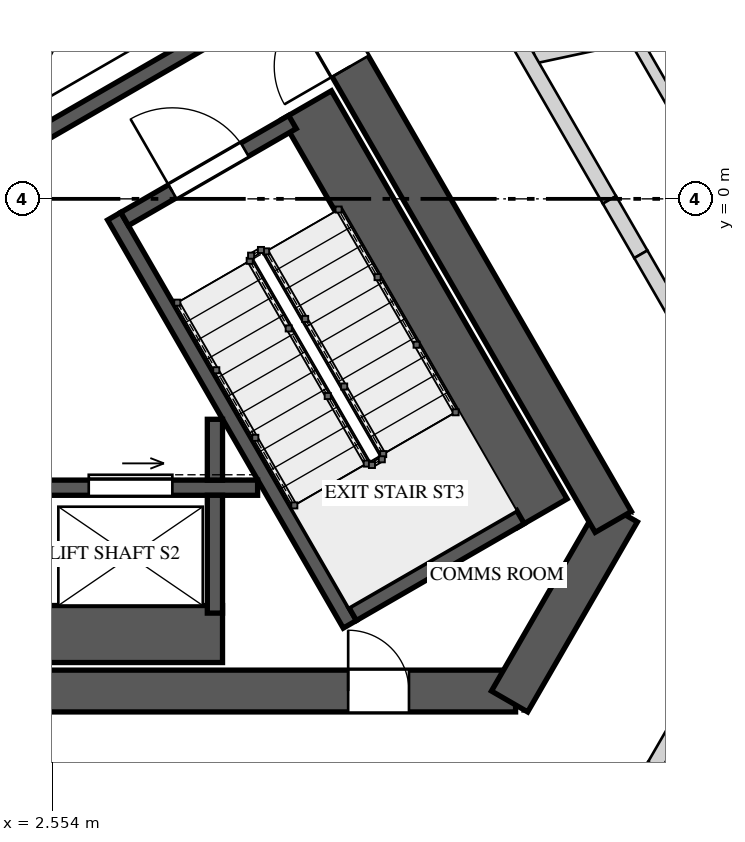
"""IFC4 building model, lengths in metres.
Left out: names, types, materials, properties, quantities, classifications, styles, units other than length and angle.
Written with IfcOpenShell. Run it as: python <this file> out.ifc"""

import sys

from ifc_helpers import new_model, si_unit, direction, frame, frame_2d, origin, place, context, subcontext, project, spatial, rectangle, extrude, element, fill, save


model = new_model("IFC4")
c1 = context("Model", 3, precision=1e-05, world=origin(), true_north=direction((0.0, 1.0)))
c2 = subcontext(c1, "Body", "Model", "MODEL_VIEW")
j1 = project(units=[si_unit("LENGTHUNIT", "METRE"), si_unit("PLANEANGLEUNIT", "RADIAN")], contexts=[c1])
p1 = place(None, origin())
s1 = spatial("IfcSite", under=j1, at=p1, CompositionType="ELEMENT")
p2 = place(p1, origin())
s2 = spatial("IfcBuilding", under=s1, at=p2, CompositionType="ELEMENT")
p3 = place(p2, frame((0.0, 0.0, 348.4)))
s3 = spatial("IfcBuildingStorey", under=s2, at=p3, CompositionType="ELEMENT", Elevation=348.4)
p4 = place(p3, frame((-8.646, -6.475, 0.0), z_axis=(0.0, 0.0, 1.0), x_axis=(1.0, 0.0, 0.0)))
e1 = element("IfcWall", 1, at=p4, inside=s3, PredefinedType="SHEAR", context=c2, shape_type="SweptSolid", body=[
    extrude(rectangle(XDim=17.292, YDim=0.55, at=frame_2d((8.646, 0.0))), origin(), (0.0, 0.0, 1.0), 4.0),
])
p5 = place(p4, frame((6.851, 0.0, 0.0)))
e2 = element("IfcOpeningElement", 2, at=p5, cuts=e1, PredefinedType="OPENING", context=c2, shape_type="SweptSolid", body=[
    extrude(rectangle(XDim=1.0, YDim=2.4, at=frame_2d((0.5, 1.2))), frame((0.0, 0.285, 0.0), z_axis=(0.0, -1.0, 0.0), x_axis=(1.0, 0.0, 0.0)), (0.0, 0.0, 1.0), 0.57),
])
p6 = place(p4, frame((15.089, 0.0, 0.0)))
e3 = element("IfcOpeningElement", 3, at=p6, cuts=e1, PredefinedType="OPENING", context=c2, shape_type="SweptSolid", body=[
    extrude(rectangle(XDim=0.8, YDim=2.1, at=frame_2d((0.4, 1.05))), frame((0.0, 0.285, 0.0), z_axis=(0.0, -1.0, 0.0), x_axis=(1.0, 0.0, 0.0)), (0.0, 0.0, 1.0), 0.57),
])
p7 = place(p3, frame((8.566, -6.613, 0.0), z_axis=(0.0, 0.0, 1.0), x_axis=(0.499995765644, 0.866027848477, 0.0)))
e4 = element("IfcWall", 4, at=p7, inside=s3, PredefinedType="SHEAR", context=c2, shape_type="SweptSolid", body=[
    extrude(rectangle(XDim=2.887, YDim=0.55, at=frame_2d((1.443, 0.0))), origin(), (0.0, 0.0, 1.0), 4.0),
])
p8 = place(p3, frame((9.93, -4.25, 0.0), z_axis=(0.0, 0.0, 1.0), x_axis=(-0.499994590896, 0.86602852671, 0.0)))
e5 = element("IfcWall", 5, at=p8, inside=s3, PredefinedType="SHEAR", context=c2, shape_type="SweptSolid", body=[
    extrude(rectangle(XDim=17.292, YDim=0.55, at=frame_2d((8.646, 0.0))), origin(), (0.0, 0.0, 1.0), 4.0),
])
p9 = place(p8, frame((6.921, 0.0, 0.0)))
e6 = element("IfcOpeningElement", 6, at=p9, cuts=e5, PredefinedType="OPENING", context=c2, shape_type="SweptSolid", body=[
    extrude(rectangle(XDim=1.0, YDim=2.4, at=frame_2d((0.5, 1.2))), frame((0.0, 0.285, 0.0), z_axis=(0.0, -1.0, 0.0), x_axis=(1.0, 0.0, 0.0)), (0.0, 0.0, 1.0), 0.57),
])
p10 = place(p3, frame((8.998, -4.135, 0.0), z_axis=(0.0, 0.0, 1.0), x_axis=(-0.500009909098, 0.866019682689, 0.0)))
e7 = element("IfcWall", 7, at=p10, inside=s3, PredefinedType="SOLIDWALL", context=c2, shape_type="SweptSolid", body=[
    extrude(rectangle(XDim=6.2, YDim=0.75, at=frame_2d((3.1, 0.0))), origin(), (0.0, 0.0, 1.0), 3.65),
])
p11 = place(p3, frame((6.465, -5.597, 0.0), z_axis=(0.0, 0.0, 1.0), x_axis=(-0.49998037582, 0.866036733513, 0.0)))
e8 = element("IfcWall", 8, at=p11, inside=s3, PredefinedType="SOLIDWALL", context=c2, shape_type="SweptSolid", body=[
    extrude(rectangle(XDim=6.2, YDim=0.2, at=frame_2d((3.1, 0.0))), origin(), (0.0, 0.0, 1.0), 3.65),
])
p12 = place(p3, frame((6.501, -5.461, 0.0), z_axis=(0.0, 0.0, 1.0), x_axis=(0.865989465428, 0.500062241894, 0.0)))
e9 = element("IfcWall", 9, at=p12, inside=s3, PredefinedType="SOLIDWALL", context=c2, shape_type="SweptSolid", body=[
    extrude(rectangle(XDim=2.55, YDim=0.2, at=frame_2d((1.275, 0.0))), origin(), (0.0, 0.0, 1.0), 3.65),
])
p13 = place(p3, frame((3.501, -0.265, 0.0), z_axis=(0.0, 0.0, 1.0), x_axis=(0.866030925526, 0.499990435942, 0.0)))
e10 = element("IfcWall", 10, at=p13, inside=s3, PredefinedType="SOLIDWALL", context=c2, shape_type="SweptSolid", body=[
    extrude(rectangle(XDim=2.55, YDim=0.2, at=frame_2d((1.275, 0.0))), origin(), (0.0, 0.0, 1.0), 3.65),
])
p14 = place(p13, frame((0.725, 0.0, 0.0)))
e11 = element("IfcOpeningElement", 11, at=p14, cuts=e10, PredefinedType="OPENING", context=c2, shape_type="SweptSolid", body=[
    extrude(rectangle(XDim=1.1, YDim=2.4, at=frame_2d((0.55, 1.2))), frame((0.0, 0.11, 0.0), z_axis=(0.0, -1.0, 0.0), x_axis=(1.0, 0.0, 0.0)), (0.0, 0.0, 1.0), 0.22),
])
p15 = place(p3, frame((-0.71, -3.8, 0.0), z_axis=(0.0, 0.0, 1.0), x_axis=(1.0, 0.0, 0.0)))
e12 = element("IfcWall", 12, at=p15, inside=s3, PredefinedType="SOLIDWALL", context=c2, shape_type="SweptSolid", body=[
    extrude(rectangle(XDim=5.961, YDim=0.2, at=frame_2d((2.981, 0.0))), origin(), (0.0, 0.0, 1.0), 3.65),
])
p16 = place(p15, frame((1.09, 0.0, 0.0)))
e13 = element("IfcOpeningElement", 13, at=p16, cuts=e12, PredefinedType="OPENING", context=c2, shape_type="SweptSolid", body=[
    extrude(rectangle(XDim=1.1, YDim=2.1, at=frame_2d((0.55, 1.05))), frame((0.0, 0.11, 0.0), z_axis=(0.0, -1.0, 0.0), x_axis=(1.0, 0.0, 0.0)), (0.0, 0.0, 1.0), 0.22),
])
p17 = place(p15, frame((3.74, 0.0, 0.0)))
e14 = element("IfcOpeningElement", 14, at=p17, cuts=e12, PredefinedType="OPENING", context=c2, shape_type="SweptSolid", body=[
    extrude(rectangle(XDim=1.1, YDim=2.1, at=frame_2d((0.55, 1.05))), frame((0.0, 0.11, 0.0), z_axis=(0.0, -1.0, 0.0), x_axis=(1.0, 0.0, 0.0)), (0.0, 0.0, 1.0), 0.22),
])
p18 = place(p3, frame((-0.71, -5.725, 0.0), z_axis=(0.0, 0.0, 1.0), x_axis=(1.0, 0.0, 0.0)))
e15 = element("IfcWall", 15, at=p18, inside=s3, PredefinedType="SOLIDWALL", context=c2, shape_type="SweptSolid", body=[
    extrude(rectangle(XDim=5.5, YDim=0.75, at=frame_2d((2.75, 0.0))), origin(), (0.0, 0.0, 1.0), 3.65),
])
p19 = place(p3, frame((4.69, -3.9, 0.0), z_axis=(0.0, 0.0, 1.0), x_axis=(0.0, -1.0, 0.0)))
e16 = element("IfcWall", 16, at=p19, inside=s3, PredefinedType="SOLIDWALL", context=c2, shape_type="SweptSolid", body=[
    extrude(rectangle(XDim=1.55, YDim=0.2, at=frame_2d((0.775, 0.0))), origin(), (0.0, 0.0, 1.0), 3.65),
])
p20 = place(p3, frame((4.69, -2.9, 0.0), z_axis=(0.0, 0.0, 1.0), x_axis=(0.0, -1.0, 0.0)))
e17 = element("IfcWall", 17, at=p20, inside=s3, PredefinedType="SOLIDWALL", context=c2, shape_type="SweptSolid", body=[
    extrude(rectangle(XDim=0.8, YDim=0.2, at=frame_2d((0.4, 0.0))), origin(), (0.0, 0.0, 1.0), 3.65),
])
p21 = place(p3, frame((2.227, 0.743, 0.0), z_axis=(0.0, 0.0, 1.0), x_axis=(0.866035871367, 0.499981869177, 0.0)))
e18 = element("IfcWall", 18, at=p21, inside=s3, PredefinedType="SOLIDWALL", context=c2, shape_type="SweptSolid", body=[
    extrude(rectangle(XDim=3.15, YDim=0.2, at=frame_2d((1.575, 0.0))), origin(), (0.0, 0.0, 1.0), 3.65),
])
p22 = place(p3, frame((9.42, 3.483, 0.0), z_axis=(0.0, 0.0, 1.0), x_axis=(0.50002680699, -0.866009926209, 0.0)))
e19 = element("IfcWall", 19, at=p22, inside=s3, PredefinedType="PARTITIONING", context=c2, shape_type="SweptSolid", body=[
    extrude(rectangle(XDim=4.12, YDim=0.15, at=frame_2d((2.06, 0.0))), origin(), (0.0, 0.0, 1.0), 3.65),
])
p23 = place(p22, frame((0.207, 0.0, 0.0)))
e20 = element("IfcOpeningElement", 20, at=p23, cuts=e19, PredefinedType="OPENING", context=c2, shape_type="SweptSolid", body=[
    extrude(rectangle(XDim=0.95, YDim=2.4, at=frame_2d((0.475, 1.2))), frame((0.0, 0.085, 0.0), z_axis=(0.0, -1.0, 0.0), x_axis=(1.0, 0.0, 0.0)), (0.0, 0.0, 1.0), 0.17),
])
p24 = place(p3, frame((8.888, 1.906, 0.0), z_axis=(0.0, 0.0, 1.0), x_axis=(0.977766421374, 0.209696984321, 0.0)))
e21 = element("IfcWall", 21, at=p24, inside=s3, PredefinedType="SOLIDWALL", context=c2, shape_type="SweptSolid", body=[
    extrude(rectangle(XDim=5.064, YDim=0.25, at=frame_2d((2.532, 0.0))), origin(), (0.0, 0.0, 1.0), 3.65),
])
p25 = place(p3, frame((10.825, -6.851, 0.0), z_axis=(0.0, 0.0, 1.0), x_axis=(-0.500144223137, -0.865942120504, 0.0)))
e22 = element("IfcWall", 22, at=p25, inside=s3, PredefinedType="SOLIDWALL", context=c2, shape_type="SweptSolid", body=[
    extrude(rectangle(XDim=0.701, YDim=0.2, at=frame_2d((0.351, 0.0))), origin(), (0.0, 0.0, 1.0), 2.95),
])
p26 = place(p3, frame((10.474, -7.458, 0.0), z_axis=(0.0, 0.0, 1.0), x_axis=(-0.499929168788, -0.866066294342, 0.0)))
e23 = element("IfcWall", 23, at=p26, inside=s3, PredefinedType="SOLIDWALL", context=c2, shape_type="SweptSolid", body=[
    extrude(rectangle(XDim=1.261, YDim=0.2, at=frame_2d((0.63, 0.0))), origin(), (0.0, 0.0, 1.0), 3.65),
])
p27 = place(p3, frame((8.169, 2.951, 0.0), z_axis=(0.0, 0.0, 1.0), x_axis=(0.499959115548, -0.866049007147, 0.0)))
e24 = element("IfcWall", 24, at=p27, inside=s3, PredefinedType="SOLIDWALL", context=c2, shape_type="SweptSolid", body=[
    extrude(rectangle(XDim=3.423, YDim=0.2, at=frame_2d((1.711, 0.0))), origin(), (0.0, 0.0, 1.0), 3.65),
])
p28 = place(p3, frame((9.88, -0.013, 0.0), z_axis=(0.0, 0.0, 1.0), x_axis=(0.499952654668, -0.866052736899, 0.0)))
e25 = element("IfcWall", 25, at=p28, inside=s3, PredefinedType="SOLIDWALL", context=c2, shape_type="SweptSolid", body=[
    extrude(rectangle(XDim=0.826, YDim=0.2, at=frame_2d((0.413, 0.0))), origin(), (0.0, 0.0, 1.0), 2.95),
])
p29 = place(p3, frame((10.293, -0.729, 0.0), z_axis=(0.0, 0.0, 1.0), x_axis=(0.50002046505, -0.86601358796, 0.0)))
e26 = element("IfcWall", 26, at=p29, inside=s3, PredefinedType="SOLIDWALL", context=c2, shape_type="SweptSolid", body=[
    extrude(rectangle(XDim=4.066, YDim=0.2, at=frame_2d((2.033, 0.0))), origin(), (0.0, 0.0, 1.0), 3.65),
])
p30 = place(p14, origin())
e27 = element("IfcDoor", 27, at=p30, inside=s3, OperationType="SINGLE_SWING_RIGHT", PredefinedType="DOOR", context=c2, shape_type="SweptSolid", body=[
    extrude(rectangle(XDim=1.1, YDim=2.4, at=frame_2d((0.55, 1.2))), frame((0.0, 0.025, 0.0), z_axis=(0.0, -1.0, 0.0), x_axis=(1.0, 0.0, 0.0)), (0.0, 0.0, 1.0), 0.05),
])
fill(e11, e27)
p31 = place(p17, origin())
e28 = element("IfcDoor", 28, at=p31, inside=s3, OperationType="SLIDING_TO_RIGHT", PredefinedType="DOOR", context=c2, shape_type="SweptSolid", body=[
    extrude(rectangle(XDim=1.1, YDim=2.1, at=frame_2d((0.55, 1.05))), frame((0.0, 0.025, 0.0), z_axis=(0.0, -1.0, 0.0), x_axis=(1.0, 0.0, 0.0)), (0.0, 0.0, 1.0), 0.05),
])
fill(e14, e28)
p32 = place(p9, origin())
e29 = element("IfcDoor", 29, at=p32, inside=s3, OperationType="SINGLE_SWING_RIGHT", PredefinedType="DOOR", context=c2, shape_type="SweptSolid", body=[
    extrude(rectangle(XDim=1.0, YDim=2.4, at=frame_2d((0.5, 1.2))), frame((0.0, 0.025, 0.0), z_axis=(0.0, -1.0, 0.0), x_axis=(1.0, 0.0, 0.0)), (0.0, 0.0, 1.0), 0.05),
])
fill(e6, e29)
p33 = place(p6, origin())
e30 = element("IfcDoor", 30, at=p33, inside=s3, OperationType="SINGLE_SWING_RIGHT", PredefinedType="DOOR", context=c2, shape_type="SweptSolid", body=[
    extrude(rectangle(XDim=0.8, YDim=2.1, at=frame_2d((0.4, 1.05))), frame((0.0, 0.025, 0.0), z_axis=(0.0, -1.0, 0.0), x_axis=(1.0, 0.0, 0.0)), (0.0, 0.0, 1.0), 0.05),
])
fill(e3, e30)
save(model, sys.argv[1])
